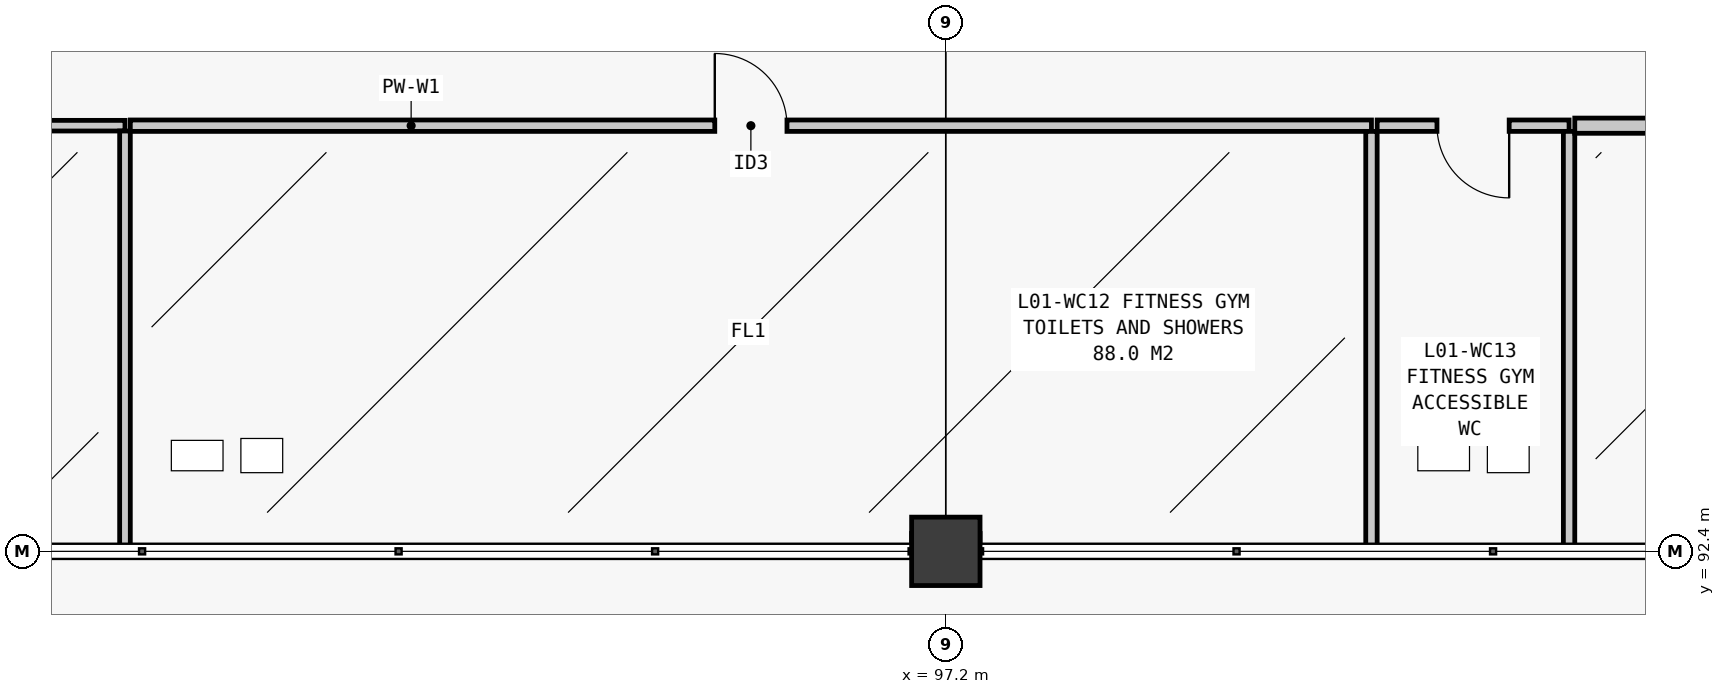
"""IFC4 building model, lengths in metres.
Left out: names, types, materials, properties, quantities, classifications, styles, units other than length and angle.
Written with IfcOpenShell. Run it as: python <this file> out.ifc"""

import sys

from ifc_helpers import new_model, si_unit, direction, frame, frame_2d, origin, origin_2d, place, context, subcontext, project, spatial, rectangle, extrude, element, fill, save


model = new_model("IFC4")
c1 = context("Model", 3, precision=1e-05, world=origin(), true_north=direction((0.0, 1.0)))
c2 = subcontext(c1, "Body", "Model", "MODEL_VIEW")
j1 = project(units=[si_unit("LENGTHUNIT", "METRE"), si_unit("PLANEANGLEUNIT", "RADIAN")], contexts=[c1])
p1 = place(None, origin())
s1 = spatial("IfcSite", under=j1, at=p1, CompositionType="ELEMENT")
p2 = place(p1, origin())
s2 = spatial("IfcBuilding", under=s1, at=p2, CompositionType="ELEMENT")
p3 = place(p2, frame((0.0, 0.0, 4.8)))
s3 = spatial("IfcBuildingStorey", under=s2, at=p3, CompositionType="ELEMENT", Elevation=4.8)
p4 = place(p3, frame((97.2, 92.4, 0.0), z_axis=(0.0, 0.0, 1.0), x_axis=(1.0, 0.0, 0.0)))
e1 = element("IfcColumn", 1, at=p4, inside=s3, PredefinedType="COLUMN", context=c2, shape_type="SweptSolid", body=[
    extrude(rectangle(XDim=0.9, YDim=0.9, at=origin_2d()), origin(), (0.0, 0.0, 1.0), 4.2),
])
p5 = place(p3, frame((54.02, 98.0, 0.0), z_axis=(0.0, 0.0, 1.0), x_axis=(1.0, 0.0, 0.0)))
e2 = element("IfcWall", 2, at=p5, inside=s3, PredefinedType="PARTITIONING", context=c2, shape_type="SweptSolid", body=[
    extrude(rectangle(XDim=32.38, YDim=0.14, at=frame_2d((16.19, 0.0))), origin(), (0.0, 0.0, 1.0), 3.94),
])
p6 = place(p5, frame((3.71, 0.0, 0.0)))
e3 = element("IfcOpeningElement", 3, at=p6, cuts=e2, PredefinedType="OPENING", context=c2, shape_type="SweptSolid", body=[
    extrude(rectangle(XDim=1.6, YDim=2.2, at=frame_2d((0.8, 1.1))), frame((0.0, 0.085, 0.0), z_axis=(0.0, -1.0, 0.0), x_axis=(1.0, 0.0, 0.0)), (0.0, 0.0, 1.0), 0.17),
])
p7 = place(p3, frame((86.4, 92.42, 0.0), z_axis=(0.0, 0.0, 1.0), x_axis=(0.0, 1.0, 0.0)))
e4 = element("IfcWall", 4, at=p7, inside=s3, PredefinedType="PARTITIONING", context=c2, shape_type="SweptSolid", body=[
    extrude(rectangle(XDim=5.51, YDim=0.14, at=frame_2d((2.755, 0.0))), origin(), (0.0, 0.0, 1.0), 3.666),
])
p8 = place(p3, frame((96.75, 92.56, 0.0), z_axis=(0.0, 0.0, 1.0), x_axis=(1.0, 0.0, 0.0)))
e5 = element("IfcWall", 5, at=p8, inside=s3, PredefinedType="PLUMBINGWALL", context=c2, shape_type="SweptSolid", body=[
    extrude(rectangle(XDim=0.9, YDim=0.15, at=frame_2d((0.45, 0.0))), origin(), (0.0, 0.0, 1.0), 3.94),
])
p9 = place(p3, frame((86.47, 98.0, 0.0), z_axis=(0.0, 0.0, 1.0), x_axis=(1.0, 0.0, 0.0)))
e6 = element("IfcWall", 6, at=p9, inside=s3, PredefinedType="PLUMBINGWALL", context=c2, shape_type="SweptSolid", body=[
    extrude(rectangle(XDim=16.33, YDim=0.15, at=frame_2d((8.165, 0.0))), origin(), (0.0, 0.0, 1.0), 3.94),
])
p10 = place(p9, frame((7.69, 0.0, 0.0)))
e7 = element("IfcOpeningElement", 7, at=p10, cuts=e6, PredefinedType="OPENING", context=c2, shape_type="SweptSolid", body=[
    extrude(rectangle(XDim=0.95, YDim=2.1, at=frame_2d((0.475, 1.05))), frame((0.0, 0.09, 0.0), z_axis=(0.0, -1.0, 0.0), x_axis=(1.0, 0.0, 0.0)), (0.0, 0.0, 1.0), 0.18),
])
p11 = place(p3, frame((102.8, 92.42, 0.0), z_axis=(0.0, 0.0, 1.0), x_axis=(0.0, 1.0, 0.0)))
e8 = element("IfcWall", 8, at=p11, inside=s3, PredefinedType="PLUMBINGWALL", context=c2, shape_type="SweptSolid", body=[
    extrude(rectangle(XDim=5.505, YDim=0.15, at=frame_2d((2.752, 0.0))), origin(), (0.0, 0.0, 1.0), 3.94),
])
p12 = place(p3, frame((102.875, 98.0, 0.0), z_axis=(0.0, 0.0, 1.0), x_axis=(1.0, 0.0, 0.0)))
e9 = element("IfcWall", 9, at=p12, inside=s3, PredefinedType="PLUMBINGWALL", context=c2, shape_type="SweptSolid", body=[
    extrude(rectangle(XDim=2.525, YDim=0.15, at=frame_2d((1.262, 0.0))), origin(), (0.0, 0.0, 1.0), 3.94),
])
p13 = place(p12, frame((0.787, 0.0, 0.0)))
e10 = element("IfcOpeningElement", 10, at=p13, cuts=e9, PredefinedType="OPENING", context=c2, shape_type="SweptSolid", body=[
    extrude(rectangle(XDim=0.95, YDim=2.1, at=frame_2d((0.475, 1.05))), frame((0.0, 0.09, 0.0), z_axis=(0.0, -1.0, 0.0), x_axis=(1.0, 0.0, 0.0)), (0.0, 0.0, 1.0), 0.18),
])
p14 = place(p3, frame((105.4, 92.42, 0.0), z_axis=(0.0, 0.0, 1.0), x_axis=(0.0, 1.0, 0.0)))
e11 = element("IfcWall", 11, at=p14, inside=s3, PredefinedType="PLUMBINGWALL", context=c2, shape_type="SweptSolid", body=[
    extrude(rectangle(XDim=5.505, YDim=0.15, at=frame_2d((2.752, 0.0))), origin(), (0.0, 0.0, 1.0), 3.94),
])
p15 = place(p3, frame((105.475, 98.0, 0.0), z_axis=(0.0, 0.0, 1.0), x_axis=(1.0, 0.0, 0.0)))
e12 = element("IfcWall", 12, at=p15, inside=s3, PredefinedType="PARTITIONING", context=c2, shape_type="SweptSolid", body=[
    extrude(rectangle(XDim=20.505, YDim=0.2, at=frame_2d((10.252, 0.0))), origin(), (0.0, 0.0, 1.0), 3.94),
])
p16 = place(p10, origin())
e13 = element("IfcDoor", 13, at=p16, inside=s3, OperationType="SINGLE_SWING_LEFT", PredefinedType="DOOR", context=c2, shape_type="SweptSolid", body=[
    extrude(rectangle(XDim=0.95, YDim=2.1, at=frame_2d((0.475, 1.05))), frame((0.0, 0.025, 0.0), z_axis=(0.0, -1.0, 0.0), x_axis=(1.0, 0.0, 0.0)), (0.0, 0.0, 1.0), 0.05),
])
fill(e7, e13)
p17 = place(p13, frame((0.95, 0.0, 0.0), z_axis=(0.0, 0.0, 1.0), x_axis=(-1.0, 0.0, 0.0)))
e14 = element("IfcDoor", 14, at=p17, inside=s3, OperationType="SINGLE_SWING_RIGHT", PredefinedType="DOOR", context=c2, shape_type="SweptSolid", body=[
    extrude(rectangle(XDim=0.95, YDim=2.1, at=frame_2d((0.475, 1.05))), frame((0.0, 0.025, 0.0), z_axis=(0.0, -1.0, 0.0), x_axis=(1.0, 0.0, 0.0)), (0.0, 0.0, 1.0), 0.05),
])
fill(e10, e14)
save(model, sys.argv[1])
